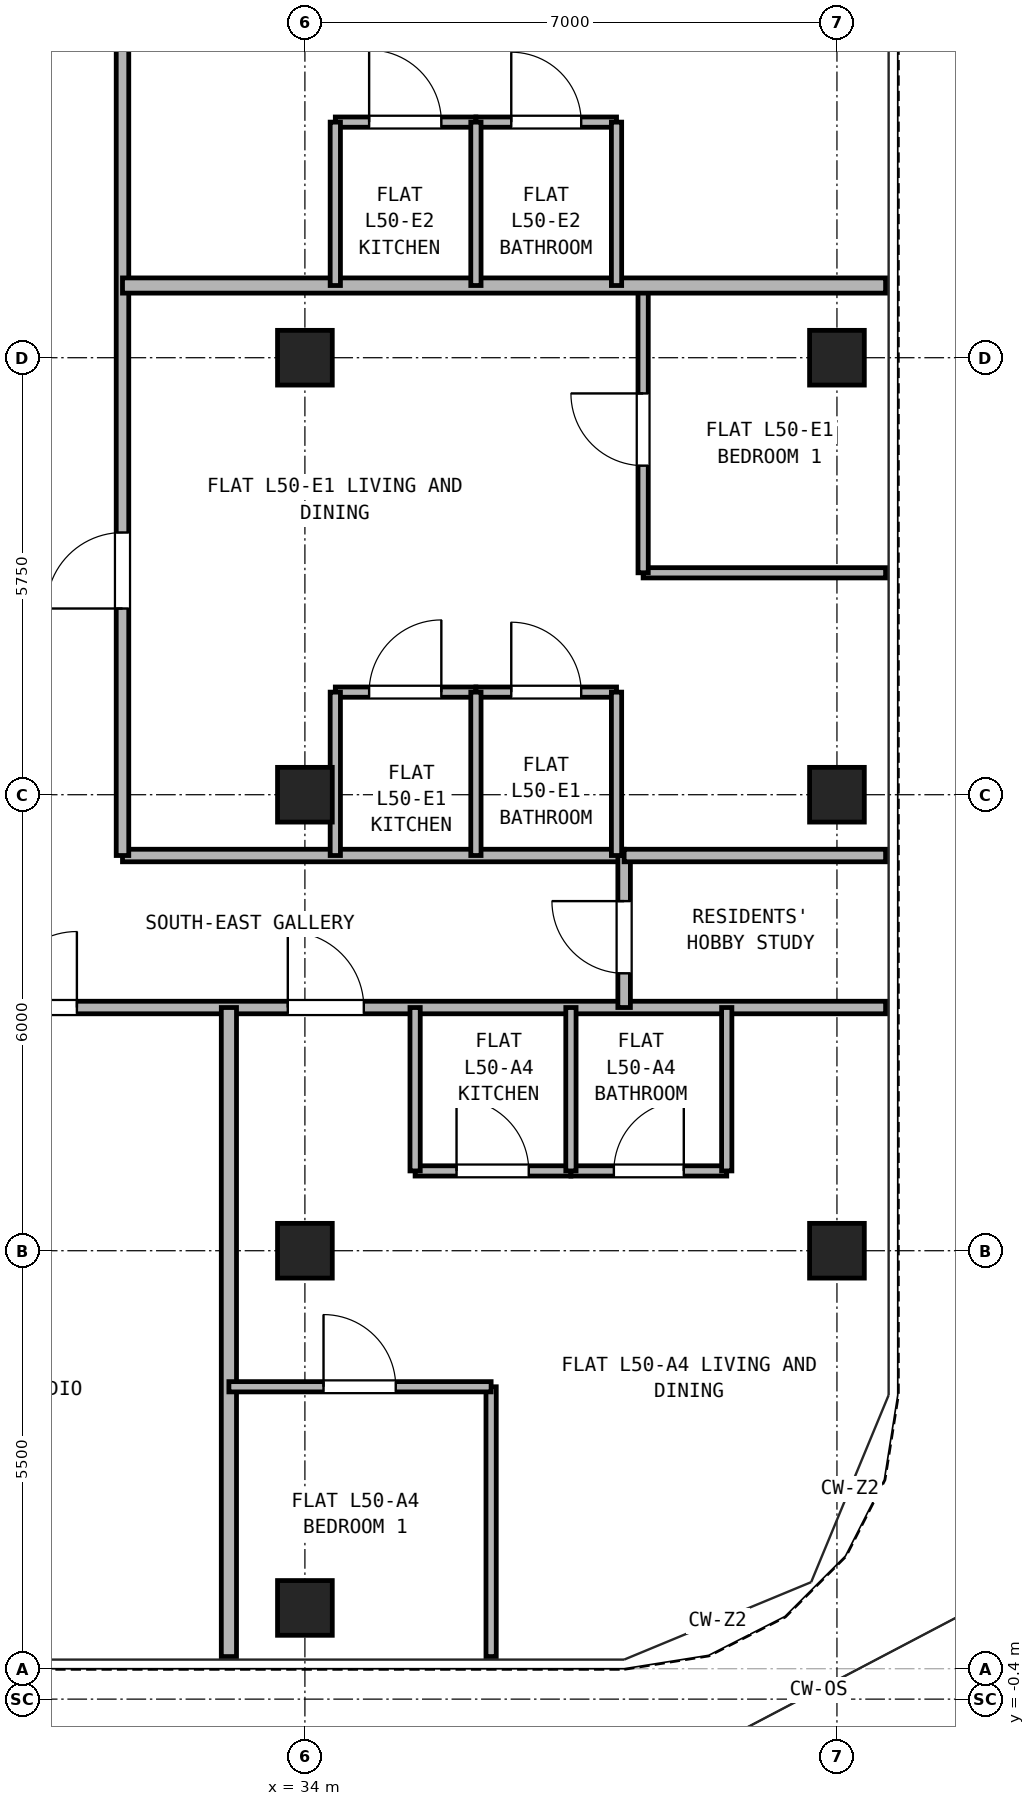
"""IFC4 building model, lengths in metres.
Left out: names, types, materials, properties, quantities, classifications, styles, units other than length and angle.
Written with IfcOpenShell. Run it as: python <this file> out.ifc"""

import sys

from ifc_helpers import new_model, si_unit, direction, frame, frame_2d, origin, origin_2d, place, context, subcontext, project, spatial, rectangle, hollow_rectangle, extrude, source, transform, mapped, element, fill, save


model = new_model("IFC4")
c1 = context("Model", 3, precision=1e-05, world=origin(), true_north=direction((0.0, 1.0)))
c2 = subcontext(c1, "Body", "Model", "MODEL_VIEW")
j1 = project(units=[si_unit("LENGTHUNIT", "METRE"), si_unit("PLANEANGLEUNIT", "RADIAN")], contexts=[c1])
p1 = place(None, origin())
s1 = spatial("IfcSite", under=j1, at=p1, CompositionType="ELEMENT")
p2 = place(p1, origin())
s2 = spatial("IfcBuilding", under=s1, at=p2, CompositionType="ELEMENT")
p3 = place(p2, frame((0.0, 0.0, 178.5)))
s3 = spatial("IfcBuildingStorey", under=s2, at=p3, CompositionType="ELEMENT", Elevation=178.5)
m1 = source(origin(), c2, "Body", "SweptSolid", [
    extrude(hollow_rectangle(XDim=0.72, YDim=0.72, WallThickness=0.04, at=origin_2d()), origin(), (0.0, 0.0, 1.0), 2.95),
])
for number, where, z_axis, x_axis in (
    (1, (34.0, 0.8, 0.0), (0.0, 0.0, 1.0), (1.0, 0.0, 0.0)),
    (2, (41.0, 5.5, 0.0), (0.0, 0.0, 1.0), (1.0, 0.0, 0.0)),
    (3, (41.0, 11.5, 0.0), (0.0, 0.0, 1.0), (1.0, 0.0, 0.0)),
    (4, (41.0, 17.25, 0.0), (0.0, 0.0, 1.0), (1.0, 0.0, 0.0)),
    (5, (34.0, 5.5, 0.0), (0.0, 0.0, 1.0), (1.0, 0.0, 0.0)),
    (6, (34.0, 11.5, 0.0), (0.0, 0.0, 1.0), (1.0, 0.0, 0.0)),
    (7, (34.0, 17.25, 0.0), (0.0, 0.0, 1.0), (1.0, 0.0, 0.0)),
):
    element("IfcColumn", number, at=place(p3, frame(where, z_axis=z_axis, x_axis=x_axis)), inside=s3, PredefinedType="COLUMN", context=c2, shape_type="MappedRepresentation", body=[
        mapped(m1, transform((0.0, 0.0, 0.0), x_axis=(1.0, 0.0, 0.0), y_axis=(0.0, 1.0, 0.0), z_axis=(0.0, 0.0, 1.0), scale=1.0)),
    ])
p4 = place(p3, frame((0.16, 8.7, 0.0), z_axis=(0.0, 0.0, 1.0), x_axis=(1.0, 0.0, 0.0)))
e8 = element("IfcWall", 8, at=p4, inside=s3, PredefinedType="PARTITIONING", context=c2, shape_type="SweptSolid", body=[
    extrude(rectangle(XDim=41.48, YDim=0.165, at=frame_2d((20.74, 0.0))), origin(), (0.0, 0.0, 1.0), 2.583),
])
p5 = place(p4, frame((11.815, 0.0, 0.0)))
e9 = element("IfcOpeningElement", 9, at=p5, cuts=e8, PredefinedType="OPENING", context=c2, shape_type="SweptSolid", body=[
    extrude(rectangle(XDim=1.0, YDim=2.15, at=frame_2d((0.5, 1.075))), frame((0.0, 0.093, 0.0), z_axis=(0.0, -1.0, 0.0), x_axis=(1.0, 0.0, 0.0)), (0.0, 0.0, 1.0), 0.185),
])
p6 = place(p4, frame((16.115, 0.0, 0.0)))
e10 = element("IfcOpeningElement", 10, at=p6, cuts=e8, PredefinedType="OPENING", context=c2, shape_type="SweptSolid", body=[
    extrude(rectangle(XDim=1.0, YDim=2.15, at=frame_2d((0.5, 1.075))), frame((0.0, 0.093, 0.0), z_axis=(0.0, -1.0, 0.0), x_axis=(1.0, 0.0, 0.0)), (0.0, 0.0, 1.0), 0.185),
])
p7 = place(p4, frame((29.84, 0.0, 0.0)))
e11 = element("IfcOpeningElement", 11, at=p7, cuts=e8, PredefinedType="OPENING", context=c2, shape_type="SweptSolid", body=[
    extrude(rectangle(XDim=1.0, YDim=2.15, at=frame_2d((0.5, 1.075))), frame((0.0, 0.093, 0.0), z_axis=(0.0, -1.0, 0.0), x_axis=(1.0, 0.0, 0.0)), (0.0, 0.0, 1.0), 0.185),
])
p8 = place(p4, frame((33.615, 0.0, 0.0)))
e12 = element("IfcOpeningElement", 12, at=p8, cuts=e8, PredefinedType="OPENING", context=c2, shape_type="SweptSolid", body=[
    extrude(rectangle(XDim=1.0, YDim=2.15, at=frame_2d((0.5, 1.075))), frame((0.0, 0.093, 0.0), z_axis=(0.0, -1.0, 0.0), x_axis=(1.0, 0.0, 0.0)), (0.0, 0.0, 1.0), 0.185),
])
p9 = place(p3, frame((31.6, 10.7, 0.0), z_axis=(0.0, 0.0, 1.0), x_axis=(1.0, 0.0, 0.0)))
e13 = element("IfcWall", 13, at=p9, inside=s3, PredefinedType="PARTITIONING", context=c2, shape_type="SweptSolid", body=[
    extrude(rectangle(XDim=6.6, YDim=0.165, at=frame_2d((3.3, 0.0))), origin(), (0.0, 0.0, 1.0), 2.95),
])
p10 = place(p3, frame((38.2, 8.7, 0.0), z_axis=(0.0, 0.0, 1.0), x_axis=(0.0, 1.0, 0.0)))
e14 = element("IfcWall", 14, at=p10, inside=s3, PredefinedType="PARTITIONING", context=c2, shape_type="SweptSolid", body=[
    extrude(rectangle(XDim=2.0, YDim=0.165, at=frame_2d((1.0, 0.0))), origin(), (0.0, 0.0, 1.0), 2.95),
])
p11 = place(p10, frame((0.45, 0.0, 0.0)))
e15 = element("IfcOpeningElement", 15, at=p11, cuts=e14, PredefinedType="OPENING", context=c2, shape_type="SweptSolid", body=[
    extrude(rectangle(XDim=0.95, YDim=2.15, at=frame_2d((0.475, 1.075))), frame((0.0, 0.093, 0.0), z_axis=(0.0, -1.0, 0.0), x_axis=(1.0, 0.0, 0.0)), (0.0, 0.0, 1.0), 0.185),
])
p12 = place(p3, frame((31.6, 10.7, 0.0), z_axis=(0.0, 0.0, 1.0), x_axis=(0.0, 1.0, 0.0)))
e16 = element("IfcWall", 16, at=p12, inside=s3, PredefinedType="PARTITIONING", context=c2, shape_type="SweptSolid", body=[
    extrude(rectangle(XDim=24.44, YDim=0.165, at=frame_2d((12.22, 0.0))), origin(), (0.0, 0.0, 1.0), 2.95),
])
p13 = place(p12, frame((3.25, 0.0, 0.0)))
e17 = element("IfcOpeningElement", 17, at=p13, cuts=e16, PredefinedType="OPENING", context=c2, shape_type="SweptSolid", body=[
    extrude(rectangle(XDim=1.0, YDim=2.15, at=frame_2d((0.5, 1.075))), frame((0.0, 0.093, 0.0), z_axis=(0.0, -1.0, 0.0), x_axis=(1.0, 0.0, 0.0)), (0.0, 0.0, 1.0), 0.185),
])
p14 = place(p12, frame((11.15, 0.0, 0.0)))
e18 = element("IfcOpeningElement", 18, at=p14, cuts=e16, PredefinedType="OPENING", context=c2, shape_type="SweptSolid", body=[
    extrude(rectangle(XDim=1.0, YDim=2.15, at=frame_2d((0.5, 1.075))), frame((0.0, 0.093, 0.0), z_axis=(0.0, -1.0, 0.0), x_axis=(1.0, 0.0, 0.0)), (0.0, 0.0, 1.0), 0.185),
])
p15 = place(p12, frame((17.7, 0.0, 0.0)))
e19 = element("IfcOpeningElement", 19, at=p15, cuts=e16, PredefinedType="OPENING", context=c2, shape_type="SweptSolid", body=[
    extrude(rectangle(XDim=1.0, YDim=2.15, at=frame_2d((0.5, 1.075))), frame((0.0, 0.093, 0.0), z_axis=(0.0, -1.0, 0.0), x_axis=(1.0, 0.0, 0.0)), (0.0, 0.0, 1.0), 0.185),
])
p16 = place(p3, frame((33.0, 0.16, 0.0), z_axis=(0.0, 0.0, 1.0), x_axis=(0.0, 1.0, 0.0)))
e20 = element("IfcWall", 20, at=p16, inside=s3, PredefinedType="PARTITIONING", context=c2, shape_type="SweptSolid", body=[
    extrude(rectangle(XDim=8.54, YDim=0.2, at=frame_2d((4.27, 0.0))), origin(), (0.0, 0.0, 1.0), 2.95),
])
p17 = place(p3, frame((35.45, 6.55, 0.0), z_axis=(0.0, 0.0, 1.0), x_axis=(1.0, 0.0, 0.0)))
e21 = element("IfcWall", 21, at=p17, inside=s3, PredefinedType="PARTITIONING", context=c2, shape_type="SweptSolid", body=[
    extrude(rectangle(XDim=2.05, YDim=0.135, at=frame_2d((1.025, 0.0))), origin(), (0.0, 0.0, 1.0), 2.95),
])
p18 = place(p17, frame((0.545, 0.0, 0.0)))
e22 = element("IfcOpeningElement", 22, at=p18, cuts=e21, PredefinedType="OPENING", context=c2, shape_type="SweptSolid", body=[
    extrude(rectangle(XDim=0.95, YDim=2.15, at=frame_2d((0.475, 1.075))), frame((0.0, 0.077, 0.0), z_axis=(0.0, -1.0, 0.0), x_axis=(1.0, 0.0, 0.0)), (0.0, 0.0, 1.0), 0.155),
])
p19 = place(p3, frame((37.5, 6.55, 0.0), z_axis=(0.0, 0.0, 1.0), x_axis=(1.0, 0.0, 0.0)))
e23 = element("IfcWall", 23, at=p19, inside=s3, PredefinedType="PARTITIONING", context=c2, shape_type="SweptSolid", body=[
    extrude(rectangle(XDim=2.05, YDim=0.135, at=frame_2d((1.025, 0.0))), origin(), (0.0, 0.0, 1.0), 2.95),
])
p20 = place(p19, frame((0.565, 0.0, 0.0)))
e24 = element("IfcOpeningElement", 24, at=p20, cuts=e23, PredefinedType="OPENING", context=c2, shape_type="SweptSolid", body=[
    extrude(rectangle(XDim=0.92, YDim=2.1, at=frame_2d((0.46, 1.05))), frame((0.0, 0.077, 0.0), z_axis=(0.0, -1.0, 0.0), x_axis=(1.0, 0.0, 0.0)), (0.0, 0.0, 1.0), 0.155),
])
for number, where, z_axis, x_axis in (
    (25, (35.45, 6.55, 0.0), (0.0, 0.0, 1.0), (0.0, 1.0, 0.0)),
    (26, (37.5, 6.55, 0.0), (0.0, 0.0, 1.0), (0.0, 1.0, 0.0)),
    (27, (39.55, 6.55, 0.0), (0.0, 0.0, 1.0), (0.0, 1.0, 0.0)),
):
    element("IfcWall", number, at=place(p3, frame(where, z_axis=z_axis, x_axis=x_axis)), inside=s3, PredefinedType="PARTITIONING", context=c2, shape_type="SweptSolid", body=[
        extrude(rectangle(XDim=2.15, YDim=0.135, at=frame_2d((1.075, 0.0))), origin(), (0.0, 0.0, 1.0), 2.95),
    ])
p21 = place(p3, frame((36.45, 0.16, 0.0), z_axis=(0.0, 0.0, 1.0), x_axis=(0.0, 1.0, 0.0)))
e28 = element("IfcWall", 28, at=p21, inside=s3, PredefinedType="PARTITIONING", context=c2, shape_type="SweptSolid", body=[
    extrude(rectangle(XDim=3.55, YDim=0.135, at=frame_2d((1.775, 0.0))), origin(), (0.0, 0.0, 1.0), 2.95),
])
p22 = place(p3, frame((33.0, 3.71, 0.0), z_axis=(0.0, 0.0, 1.0), x_axis=(1.0, 0.0, 0.0)))
e29 = element("IfcWall", 29, at=p22, inside=s3, PredefinedType="PARTITIONING", context=c2, shape_type="SweptSolid", body=[
    extrude(rectangle(XDim=3.45, YDim=0.135, at=frame_2d((1.725, 0.0))), origin(), (0.0, 0.0, 1.0), 2.95),
])
p23 = place(p22, frame((1.245, 0.0, 0.0)))
e30 = element("IfcOpeningElement", 30, at=p23, cuts=e29, PredefinedType="OPENING", context=c2, shape_type="SweptSolid", body=[
    extrude(rectangle(XDim=0.95, YDim=2.15, at=frame_2d((0.475, 1.075))), frame((0.0, 0.077, 0.0), z_axis=(0.0, -1.0, 0.0), x_axis=(1.0, 0.0, 0.0)), (0.0, 0.0, 1.0), 0.155),
])
p24 = place(p3, frame((38.2, 10.7, 0.0), z_axis=(0.0, 0.0, 1.0), x_axis=(1.0, 0.0, 0.0)))
e31 = element("IfcWall", 31, at=p24, inside=s3, PredefinedType="PARTITIONING", context=c2, shape_type="SweptSolid", body=[
    extrude(rectangle(XDim=3.44, YDim=0.165, at=frame_2d((1.72, 0.0))), origin(), (0.0, 0.0, 1.0), 2.95),
])
p25 = place(p3, frame((34.4, 12.85, 0.0), z_axis=(0.0, 0.0, 1.0), x_axis=(1.0, 0.0, 0.0)))
e32 = element("IfcWall", 32, at=p25, inside=s3, PredefinedType="PARTITIONING", context=c2, shape_type="SweptSolid", body=[
    extrude(rectangle(XDim=1.85, YDim=0.135, at=frame_2d((0.925, 0.0))), origin(), (0.0, 0.0, 1.0), 2.95),
])
p26 = place(p25, frame((0.445, 0.0, 0.0)))
e33 = element("IfcOpeningElement", 33, at=p26, cuts=e32, PredefinedType="OPENING", context=c2, shape_type="SweptSolid", body=[
    extrude(rectangle(XDim=0.95, YDim=2.15, at=frame_2d((0.475, 1.075))), frame((0.0, 0.077, 0.0), z_axis=(0.0, -1.0, 0.0), x_axis=(1.0, 0.0, 0.0)), (0.0, 0.0, 1.0), 0.155),
])
p27 = place(p3, frame((36.25, 12.85, 0.0), z_axis=(0.0, 0.0, 1.0), x_axis=(1.0, 0.0, 0.0)))
e34 = element("IfcWall", 34, at=p27, inside=s3, PredefinedType="PARTITIONING", context=c2, shape_type="SweptSolid", body=[
    extrude(rectangle(XDim=1.85, YDim=0.135, at=frame_2d((0.925, 0.0))), origin(), (0.0, 0.0, 1.0), 2.95),
])
p28 = place(p27, frame((0.465, 0.0, 0.0)))
e35 = element("IfcOpeningElement", 35, at=p28, cuts=e34, PredefinedType="OPENING", context=c2, shape_type="SweptSolid", body=[
    extrude(rectangle(XDim=0.92, YDim=2.1, at=frame_2d((0.46, 1.05))), frame((0.0, 0.077, 0.0), z_axis=(0.0, -1.0, 0.0), x_axis=(1.0, 0.0, 0.0)), (0.0, 0.0, 1.0), 0.155),
])
for number, where, z_axis, x_axis in (
    (36, (34.4, 10.7, 0.0), (0.0, 0.0, 1.0), (0.0, 1.0, 0.0)),
    (37, (36.25, 10.7, 0.0), (0.0, 0.0, 1.0), (0.0, 1.0, 0.0)),
    (38, (38.1, 10.7, 0.0), (0.0, 0.0, 1.0), (0.0, 1.0, 0.0)),
):
    element("IfcWall", number, at=place(p3, frame(where, z_axis=z_axis, x_axis=x_axis)), inside=s3, PredefinedType="PARTITIONING", context=c2, shape_type="SweptSolid", body=[
        extrude(rectangle(XDim=2.15, YDim=0.135, at=frame_2d((1.075, 0.0))), origin(), (0.0, 0.0, 1.0), 2.95),
    ])
p29 = place(p3, frame((38.45, 14.42, 0.0), z_axis=(0.0, 0.0, 1.0), x_axis=(1.0, 0.0, 0.0)))
e39 = element("IfcWall", 39, at=p29, inside=s3, PredefinedType="PARTITIONING", context=c2, shape_type="SweptSolid", body=[
    extrude(rectangle(XDim=3.19, YDim=0.135, at=frame_2d((1.595, 0.0))), origin(), (0.0, 0.0, 1.0), 2.583),
])
p30 = place(p3, frame((38.45, 14.42, 0.0), z_axis=(0.0, 0.0, 1.0), x_axis=(0.0, 1.0, 0.0)))
e40 = element("IfcWall", 40, at=p30, inside=s3, PredefinedType="PARTITIONING", context=c2, shape_type="SweptSolid", body=[
    extrude(rectangle(XDim=3.78, YDim=0.135, at=frame_2d((1.89, 0.0))), origin(), (0.0, 0.0, 1.0), 2.95),
])
p31 = place(p30, frame((1.41, 0.0, 0.0)))
e41 = element("IfcOpeningElement", 41, at=p31, cuts=e40, PredefinedType="OPENING", context=c2, shape_type="SweptSolid", body=[
    extrude(rectangle(XDim=0.95, YDim=2.15, at=frame_2d((0.475, 1.075))), frame((0.0, 0.077, 0.0), z_axis=(0.0, -1.0, 0.0), x_axis=(1.0, 0.0, 0.0)), (0.0, 0.0, 1.0), 0.155),
])
p32 = place(p3, frame((31.6, 18.2, 0.0), z_axis=(0.0, 0.0, 1.0), x_axis=(1.0, 0.0, 0.0)))
e42 = element("IfcWall", 42, at=p32, inside=s3, PredefinedType="PARTITIONING", context=c2, shape_type="SweptSolid", body=[
    extrude(rectangle(XDim=10.04, YDim=0.2, at=frame_2d((5.02, 0.0))), origin(), (0.0, 0.0, 1.0), 2.95),
])
p33 = place(p3, frame((34.4, 20.35, 0.0), z_axis=(0.0, 0.0, 1.0), x_axis=(1.0, 0.0, 0.0)))
e43 = element("IfcWall", 43, at=p33, inside=s3, PredefinedType="PARTITIONING", context=c2, shape_type="SweptSolid", body=[
    extrude(rectangle(XDim=1.85, YDim=0.135, at=frame_2d((0.925, 0.0))), origin(), (0.0, 0.0, 1.0), 2.583),
])
p34 = place(p33, frame((0.445, 0.0, 0.0)))
e44 = element("IfcOpeningElement", 44, at=p34, cuts=e43, PredefinedType="OPENING", context=c2, shape_type="SweptSolid", body=[
    extrude(rectangle(XDim=0.95, YDim=2.15, at=frame_2d((0.475, 1.075))), frame((0.0, 0.077, 0.0), z_axis=(0.0, -1.0, 0.0), x_axis=(1.0, 0.0, 0.0)), (0.0, 0.0, 1.0), 0.155),
])
p35 = place(p3, frame((36.25, 20.35, 0.0), z_axis=(0.0, 0.0, 1.0), x_axis=(1.0, 0.0, 0.0)))
e45 = element("IfcWall", 45, at=p35, inside=s3, PredefinedType="PARTITIONING", context=c2, shape_type="SweptSolid", body=[
    extrude(rectangle(XDim=1.85, YDim=0.135, at=frame_2d((0.925, 0.0))), origin(), (0.0, 0.0, 1.0), 2.583),
])
p36 = place(p35, frame((0.465, 0.0, 0.0)))
e46 = element("IfcOpeningElement", 46, at=p36, cuts=e45, PredefinedType="OPENING", context=c2, shape_type="SweptSolid", body=[
    extrude(rectangle(XDim=0.92, YDim=2.1, at=frame_2d((0.46, 1.05))), frame((0.0, 0.077, 0.0), z_axis=(0.0, -1.0, 0.0), x_axis=(1.0, 0.0, 0.0)), (0.0, 0.0, 1.0), 0.155),
])
for number, where, z_axis, x_axis in (
    (47, (34.4, 18.2, 0.0), (0.0, 0.0, 1.0), (0.0, 1.0, 0.0)),
    (48, (36.25, 18.2, 0.0), (0.0, 0.0, 1.0), (0.0, 1.0, 0.0)),
    (49, (38.1, 18.2, 0.0), (0.0, 0.0, 1.0), (0.0, 1.0, 0.0)),
):
    element("IfcWall", number, at=place(p3, frame(where, z_axis=z_axis, x_axis=x_axis)), inside=s3, PredefinedType="PARTITIONING", context=c2, shape_type="SweptSolid", body=[
        extrude(rectangle(XDim=2.15, YDim=0.135, at=frame_2d((1.075, 0.0))), origin(), (0.0, 0.0, 1.0), 2.95),
    ])
p37 = place(p7, frame((1.0, 0.0, 0.0), z_axis=(0.0, 0.0, 1.0), x_axis=(-1.0, 0.0, 0.0)))
e50 = element("IfcDoor", 50, at=p37, inside=s3, OperationType="SINGLE_SWING_RIGHT", PredefinedType="DOOR", context=c2, shape_type="SweptSolid", body=[
    extrude(rectangle(XDim=1.0, YDim=2.15, at=frame_2d((0.5, 1.075))), frame((0.0, 0.025, 0.0), z_axis=(0.0, -1.0, 0.0), x_axis=(1.0, 0.0, 0.0)), (0.0, 0.0, 1.0), 0.05),
])
fill(e11, e50)
p38 = place(p18, origin())
e51 = element("IfcDoor", 51, at=p38, inside=s3, OperationType="SINGLE_SWING_LEFT", PredefinedType="DOOR", context=c2, shape_type="SweptSolid", body=[
    extrude(rectangle(XDim=0.95, YDim=2.15, at=frame_2d((0.475, 1.075))), frame((0.0, 0.025, 0.0), z_axis=(0.0, -1.0, 0.0), x_axis=(1.0, 0.0, 0.0)), (0.0, 0.0, 1.0), 0.05),
])
fill(e22, e51)
p39 = place(p20, origin())
e52 = element("IfcDoor", 52, at=p39, inside=s3, OperationType="SINGLE_SWING_RIGHT", PredefinedType="DOOR", context=c2, shape_type="SweptSolid", body=[
    extrude(rectangle(XDim=0.92, YDim=2.1, at=frame_2d((0.46, 1.05))), frame((0.0, 0.025, 0.0), z_axis=(0.0, -1.0, 0.0), x_axis=(1.0, 0.0, 0.0)), (0.0, 0.0, 1.0), 0.05),
])
fill(e24, e52)
p40 = place(p23, frame((0.95, 0.0, 0.0), z_axis=(0.0, 0.0, 1.0), x_axis=(-1.0, 0.0, 0.0)))
e53 = element("IfcDoor", 53, at=p40, inside=s3, OperationType="SINGLE_SWING_LEFT", PredefinedType="DOOR", context=c2, shape_type="SweptSolid", body=[
    extrude(rectangle(XDim=0.95, YDim=2.15, at=frame_2d((0.475, 1.075))), frame((0.0, 0.025, 0.0), z_axis=(0.0, -1.0, 0.0), x_axis=(1.0, 0.0, 0.0)), (0.0, 0.0, 1.0), 0.05),
])
fill(e30, e53)
p41 = place(p8, frame((1.0, 0.0, 0.0), z_axis=(0.0, 0.0, 1.0), x_axis=(-1.0, 0.0, 0.0)))
e54 = element("IfcDoor", 54, at=p41, inside=s3, OperationType="SINGLE_SWING_LEFT", PredefinedType="DOOR", context=c2, shape_type="SweptSolid", body=[
    extrude(rectangle(XDim=1.0, YDim=2.15, at=frame_2d((0.5, 1.075))), frame((0.0, 0.025, 0.0), z_axis=(0.0, -1.0, 0.0), x_axis=(1.0, 0.0, 0.0)), (0.0, 0.0, 1.0), 0.05),
])
fill(e12, e54)
p42 = place(p11, origin())
e55 = element("IfcDoor", 55, at=p42, inside=s3, OperationType="SINGLE_SWING_RIGHT", PredefinedType="DOOR", context=c2, shape_type="SweptSolid", body=[
    extrude(rectangle(XDim=0.95, YDim=2.15, at=frame_2d((0.475, 1.075))), frame((0.0, 0.025, 0.0), z_axis=(0.0, -1.0, 0.0), x_axis=(1.0, 0.0, 0.0)), (0.0, 0.0, 1.0), 0.05),
])
fill(e15, e55)
p43 = place(p26, origin())
e56 = element("IfcDoor", 56, at=p43, inside=s3, OperationType="SINGLE_SWING_RIGHT", PredefinedType="DOOR", context=c2, shape_type="SweptSolid", body=[
    extrude(rectangle(XDim=0.95, YDim=2.15, at=frame_2d((0.475, 1.075))), frame((0.0, 0.025, 0.0), z_axis=(0.0, -1.0, 0.0), x_axis=(1.0, 0.0, 0.0)), (0.0, 0.0, 1.0), 0.05),
])
fill(e33, e56)
p44 = place(p28, origin())
e57 = element("IfcDoor", 57, at=p44, inside=s3, OperationType="SINGLE_SWING_LEFT", PredefinedType="DOOR", context=c2, shape_type="SweptSolid", body=[
    extrude(rectangle(XDim=0.92, YDim=2.1, at=frame_2d((0.46, 1.05))), frame((0.0, 0.025, 0.0), z_axis=(0.0, -1.0, 0.0), x_axis=(1.0, 0.0, 0.0)), (0.0, 0.0, 1.0), 0.05),
])
fill(e35, e57)
p45 = place(p31, frame((0.95, 0.0, 0.0), z_axis=(0.0, 0.0, 1.0), x_axis=(-1.0, 0.0, 0.0)))
e58 = element("IfcDoor", 58, at=p45, inside=s3, OperationType="SINGLE_SWING_RIGHT", PredefinedType="DOOR", context=c2, shape_type="SweptSolid", body=[
    extrude(rectangle(XDim=0.95, YDim=2.15, at=frame_2d((0.475, 1.075))), frame((0.0, 0.025, 0.0), z_axis=(0.0, -1.0, 0.0), x_axis=(1.0, 0.0, 0.0)), (0.0, 0.0, 1.0), 0.05),
])
fill(e41, e58)
p46 = place(p13, frame((1.0, 0.0, 0.0), z_axis=(0.0, 0.0, 1.0), x_axis=(-1.0, 0.0, 0.0)))
e59 = element("IfcDoor", 59, at=p46, inside=s3, OperationType="SINGLE_SWING_LEFT", PredefinedType="DOOR", context=c2, shape_type="SweptSolid", body=[
    extrude(rectangle(XDim=1.0, YDim=2.15, at=frame_2d((0.5, 1.075))), frame((0.0, 0.025, 0.0), z_axis=(0.0, -1.0, 0.0), x_axis=(1.0, 0.0, 0.0)), (0.0, 0.0, 1.0), 0.05),
])
fill(e17, e59)
p47 = place(p34, origin())
e60 = element("IfcDoor", 60, at=p47, inside=s3, OperationType="SINGLE_SWING_LEFT", PredefinedType="DOOR", context=c2, shape_type="SweptSolid", body=[
    extrude(rectangle(XDim=0.95, YDim=2.15, at=frame_2d((0.475, 1.075))), frame((0.0, 0.025, 0.0), z_axis=(0.0, -1.0, 0.0), x_axis=(1.0, 0.0, 0.0)), (0.0, 0.0, 1.0), 0.05),
])
fill(e44, e60)
p48 = place(p36, origin())
e61 = element("IfcDoor", 61, at=p48, inside=s3, OperationType="SINGLE_SWING_LEFT", PredefinedType="DOOR", context=c2, shape_type="SweptSolid", body=[
    extrude(rectangle(XDim=0.92, YDim=2.1, at=frame_2d((0.46, 1.05))), frame((0.0, 0.025, 0.0), z_axis=(0.0, -1.0, 0.0), x_axis=(1.0, 0.0, 0.0)), (0.0, 0.0, 1.0), 0.05),
])
fill(e46, e61)
save(model, sys.argv[1])
